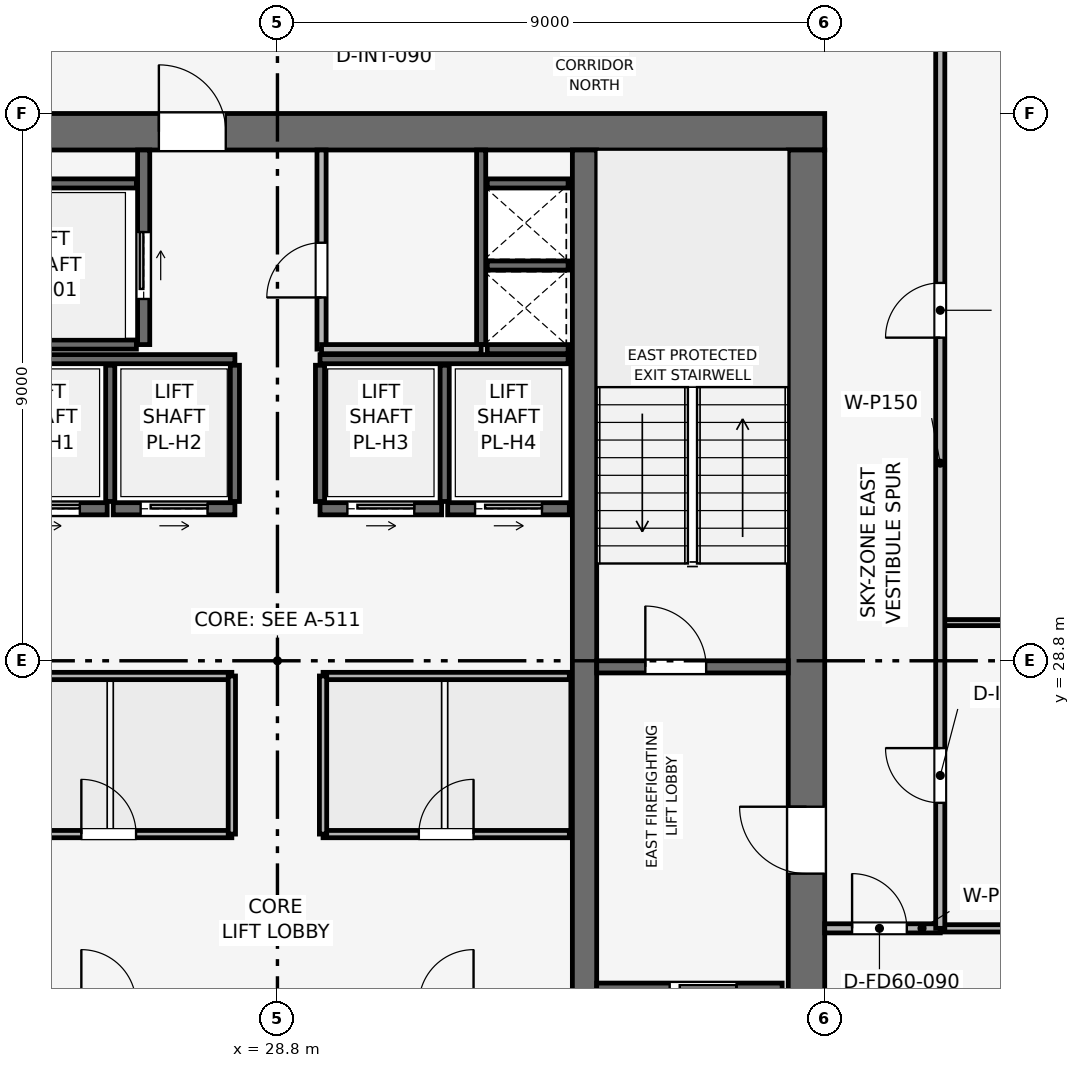
"""IFC4 building model, lengths in metres.
Left out: names, types, materials, properties, quantities, classifications, styles, units other than length and angle.
Written with IfcOpenShell. Run it as: python <this file> out.ifc"""

import sys

from ifc_helpers import new_model, si_unit, direction, frame, frame_2d, origin, place, context, subcontext, project, spatial, rectangle, extrude, element, fill, save


model = new_model("IFC4")
c1 = context("Model", 3, precision=1e-05, world=origin(), true_north=direction((0.0, 1.0)))
c2 = subcontext(c1, "Body", "Model", "MODEL_VIEW")
j1 = project(units=[si_unit("LENGTHUNIT", "METRE"), si_unit("PLANEANGLEUNIT", "RADIAN")], contexts=[c1])
p1 = place(None, origin())
s1 = spatial("IfcSite", under=j1, at=p1, CompositionType="ELEMENT")
p2 = place(p1, origin())
s2 = spatial("IfcBuilding", under=s1, at=p2, CompositionType="ELEMENT")
p3 = place(p2, frame((0.0, 0.0, 321.75)))
s3 = spatial("IfcBuildingStorey", under=s2, at=p3, CompositionType="ELEMENT", Elevation=321.75)
p4 = place(p3, frame((19.8, 37.5, 0.0), z_axis=(0.0, 0.0, 1.0), x_axis=(1.0, 0.0, 0.0)))
e1 = element("IfcWall", 1, at=p4, inside=s3, PredefinedType="SHEAR", context=c2, shape_type="SweptSolid", body=[
    extrude(rectangle(XDim=18.0, YDim=0.6, at=frame_2d((9.0, 0.0))), origin(), (0.0, 0.0, 1.0), 3.75),
])
p5 = place(p4, frame((7.05, 0.0, 0.0)))
e2 = element("IfcOpeningElement", 2, at=p5, cuts=e1, PredefinedType="OPENING", context=c2, shape_type="SweptSolid", body=[
    extrude(rectangle(XDim=1.1, YDim=2.15, at=frame_2d((0.55, 1.075))), frame((0.0, 0.31, 0.0), z_axis=(0.0, -1.0, 0.0), x_axis=(1.0, 0.0, 0.0)), (0.0, 0.0, 1.0), 0.62),
])
p6 = place(p3, frame((37.5, 20.4, 0.0), z_axis=(0.0, 0.0, 1.0), x_axis=(0.0, 1.0, 0.0)))
e3 = element("IfcWall", 3, at=p6, inside=s3, PredefinedType="SHEAR", context=c2, shape_type="SweptSolid", body=[
    extrude(rectangle(XDim=16.8, YDim=0.6, at=frame_2d((8.4, 0.0))), origin(), (0.0, 0.0, 1.0), 3.75),
])
p7 = place(p6, frame((4.9, 0.0, 0.0)))
e4 = element("IfcOpeningElement", 4, at=p7, cuts=e3, PredefinedType="OPENING", context=c2, shape_type="SweptSolid", body=[
    extrude(rectangle(XDim=1.1, YDim=2.15, at=frame_2d((0.55, 1.075))), frame((0.0, 0.31, 0.0), z_axis=(0.0, -1.0, 0.0), x_axis=(1.0, 0.0, 0.0)), (0.0, 0.0, 1.0), 0.62),
])
p8 = place(p3, frame((33.85, 20.4, 0.0), z_axis=(0.0, 0.0, 1.0), x_axis=(0.0, 1.0, 0.0)))
e5 = element("IfcWall", 5, at=p8, inside=s3, PredefinedType="SHEAR", context=c2, shape_type="SweptSolid", body=[
    extrude(rectangle(XDim=16.8, YDim=0.4, at=frame_2d((8.4, 0.0))), origin(), (0.0, 0.0, 1.0), 3.75),
])
p9 = place(p3, frame((34.05, 28.7, 0.0), z_axis=(0.0, 0.0, 1.0), x_axis=(1.0, 0.0, 0.0)))
e6 = element("IfcWall", 6, at=p9, inside=s3, PredefinedType="SHEAR", context=c2, shape_type="SweptSolid", body=[
    extrude(rectangle(XDim=3.15, YDim=0.2, at=frame_2d((1.575, 0.0))), origin(), (0.0, 0.0, 1.0), 3.51),
])
p10 = place(p9, frame((0.8, 0.0, 0.0)))
e7 = element("IfcOpeningElement", 7, at=p10, cuts=e6, PredefinedType="OPENING", context=c2, shape_type="SweptSolid", body=[
    extrude(rectangle(XDim=1.0, YDim=2.1, at=frame_2d((0.5, 1.05))), frame((0.0, 0.11, 0.0), z_axis=(0.0, -1.0, 0.0), x_axis=(1.0, 0.0, 0.0)), (0.0, 0.0, 1.0), 0.22),
])
p11 = place(p3, frame((32.15, 34.0, 0.0), z_axis=(0.0, 0.0, 1.0), x_axis=(0.0, 1.0, 0.0)))
e8 = element("IfcWall", 8, at=p11, inside=s3, PredefinedType="SHEAR", context=c2, shape_type="SweptSolid", body=[
    extrude(rectangle(XDim=3.2, YDim=0.15, at=frame_2d((1.6, 0.0))), origin(), (0.0, 0.0, 1.0), 3.51),
])
for number, where, z_axis, x_axis in (
    (9, (32.25, 33.925, 0.0), (0.0, 0.0, 1.0), (1.0, 0.0, 0.0)),
    (10, (32.25, 35.3, 0.0), (0.0, 0.0, 1.0), (1.0, 0.0, 0.0)),
):
    element("IfcWall", number, at=place(p3, frame(where, z_axis=z_axis, x_axis=x_axis)), inside=s3, PredefinedType="SHEAR", context=c2, shape_type="SweptSolid", body=[
        extrude(rectangle(XDim=1.33, YDim=0.15, at=frame_2d((0.665, 0.0))), origin(), (0.0, 0.0, 1.0), 3.51),
    ])
p12 = place(p3, frame((34.05, 23.4, 0.0), z_axis=(0.0, 0.0, 1.0), x_axis=(1.0, 0.0, 0.0)))
e11 = element("IfcWall", 11, at=p12, inside=s3, PredefinedType="SHEAR", context=c2, shape_type="SweptSolid", body=[
    extrude(rectangle(XDim=3.05, YDim=0.2, at=frame_2d((1.525, 0.0))), origin(), (0.0, 0.0, 1.0), 3.51),
])
p13 = place(p12, frame((1.2, 0.0, 0.0)))
e12 = element("IfcOpeningElement", 12, at=p13, cuts=e11, PredefinedType="OPENING", context=c2, shape_type="SweptSolid", body=[
    extrude(rectangle(XDim=1.1, YDim=2.15, at=frame_2d((0.55, 1.075))), frame((0.0, 0.11, 0.0), z_axis=(0.0, -1.0, 0.0), x_axis=(1.0, 0.0, 0.0)), (0.0, 0.0, 1.0), 0.22),
])
p14 = place(p3, frame((26.6, 34.0, 0.0), z_axis=(0.0, 0.0, 1.0), x_axis=(0.0, 1.0, 0.0)))
e13 = element("IfcWall", 13, at=p14, inside=s3, PredefinedType="SHEAR", context=c2, shape_type="SweptSolid", body=[
    extrude(rectangle(XDim=3.2, YDim=0.2, at=frame_2d((1.6, 0.0))), origin(), (0.0, 0.0, 1.0), 3.51),
])
p15 = place(p14, frame((0.75, 0.0, 0.0)))
e14 = element("IfcOpeningElement", 14, at=p15, cuts=e13, PredefinedType="OPENING", context=c2, shape_type="SweptSolid", body=[
    extrude(rectangle(XDim=1.1, YDim=2.15, at=frame_2d((0.55, 1.075))), frame((0.0, 0.11, 0.0), z_axis=(0.0, -1.0, 0.0), x_axis=(1.0, 0.0, 0.0)), (0.0, 0.0, 1.0), 0.22),
])
for number, where, z_axis, x_axis in (
    (15, (24.0, 34.0, 0.0), (0.0, 0.0, 1.0), (1.0, 0.0, 0.0)),
    (16, (24.0, 36.65, 0.0), (0.0, 0.0, 1.0), (1.0, 0.0, 0.0)),
):
    element("IfcWall", number, at=place(p3, frame(where, z_axis=z_axis, x_axis=x_axis)), inside=s3, PredefinedType="SHEAR", context=c2, shape_type="SweptSolid", body=[
        extrude(rectangle(XDim=2.48, YDim=0.15, at=frame_2d((1.24, 0.0))), origin(), (0.0, 0.0, 1.0), 3.51),
    ])
p16 = place(p3, frame((24.0, 31.3, 0.0), z_axis=(0.0, 0.0, 1.0), x_axis=(1.0, 0.0, 0.0)))
e17 = element("IfcWall", 17, at=p16, inside=s3, PredefinedType="SHEAR", context=c2, shape_type="SweptSolid", body=[
    extrude(rectangle(XDim=2.0, YDim=0.2, at=frame_2d((1.0, 0.0))), origin(), (0.0, 0.0, 1.0), 3.51),
])
p17 = place(p16, frame((0.45, 0.0, 0.0)))
e18 = element("IfcOpeningElement", 18, at=p17, cuts=e17, PredefinedType="OPENING", context=c2, shape_type="SweptSolid", body=[
    extrude(rectangle(XDim=1.1, YDim=2.15, at=frame_2d((0.55, 1.075))), frame((0.0, 0.11, 0.0), z_axis=(0.0, -1.0, 0.0), x_axis=(1.0, 0.0, 0.0)), (0.0, 0.0, 1.0), 0.22),
])
p18 = place(p3, frame((26.1, 31.3, 0.0), z_axis=(0.0, 0.0, 1.0), x_axis=(1.0, 0.0, 0.0)))
e19 = element("IfcWall", 19, at=p18, inside=s3, PredefinedType="SHEAR", context=c2, shape_type="SweptSolid", body=[
    extrude(rectangle(XDim=2.0, YDim=0.2, at=frame_2d((1.0, 0.0))), origin(), (0.0, 0.0, 1.0), 3.51),
])
p19 = place(p18, frame((0.45, 0.0, 0.0)))
e20 = element("IfcOpeningElement", 20, at=p19, cuts=e19, PredefinedType="OPENING", context=c2, shape_type="SweptSolid", body=[
    extrude(rectangle(XDim=1.1, YDim=2.15, at=frame_2d((0.55, 1.075))), frame((0.0, 0.11, 0.0), z_axis=(0.0, -1.0, 0.0), x_axis=(1.0, 0.0, 0.0)), (0.0, 0.0, 1.0), 0.22),
])
p20 = place(p3, frame((29.5, 31.3, 0.0), z_axis=(0.0, 0.0, 1.0), x_axis=(1.0, 0.0, 0.0)))
e21 = element("IfcWall", 21, at=p20, inside=s3, PredefinedType="SHEAR", context=c2, shape_type="SweptSolid", body=[
    extrude(rectangle(XDim=2.0, YDim=0.2, at=frame_2d((1.0, 0.0))), origin(), (0.0, 0.0, 1.0), 3.51),
])
p21 = place(p20, frame((0.45, 0.0, 0.0)))
e22 = element("IfcOpeningElement", 22, at=p21, cuts=e21, PredefinedType="OPENING", context=c2, shape_type="SweptSolid", body=[
    extrude(rectangle(XDim=1.1, YDim=2.15, at=frame_2d((0.55, 1.075))), frame((0.0, 0.11, 0.0), z_axis=(0.0, -1.0, 0.0), x_axis=(1.0, 0.0, 0.0)), (0.0, 0.0, 1.0), 0.22),
])
p22 = place(p3, frame((31.6, 31.3, 0.0), z_axis=(0.0, 0.0, 1.0), x_axis=(1.0, 0.0, 0.0)))
e23 = element("IfcWall", 23, at=p22, inside=s3, PredefinedType="SHEAR", context=c2, shape_type="SweptSolid", body=[
    extrude(rectangle(XDim=2.0, YDim=0.2, at=frame_2d((1.0, 0.0))), origin(), (0.0, 0.0, 1.0), 3.51),
])
p23 = place(p22, frame((0.45, 0.0, 0.0)))
e24 = element("IfcOpeningElement", 24, at=p23, cuts=e23, PredefinedType="OPENING", context=c2, shape_type="SweptSolid", body=[
    extrude(rectangle(XDim=1.1, YDim=2.15, at=frame_2d((0.55, 1.075))), frame((0.0, 0.11, 0.0), z_axis=(0.0, -1.0, 0.0), x_axis=(1.0, 0.0, 0.0)), (0.0, 0.0, 1.0), 0.22),
])
p24 = place(p3, frame((32.25, 36.65, 0.0), z_axis=(0.0, 0.0, 1.0), x_axis=(1.0, 0.0, 0.0)))
e25 = element("IfcWall", 25, at=p24, inside=s3, PredefinedType="SHEAR", context=c2, shape_type="SweptSolid", body=[
    extrude(rectangle(XDim=1.33, YDim=0.15, at=frame_2d((0.665, 0.0))), origin(), (0.0, 0.0, 1.0), 3.51),
])
for number, where, z_axis, x_axis in (
    (26, (24.02, 33.76, 0.0), (0.0, 0.0, 1.0), (1.0, 0.0, 0.0)),
    (27, (29.5, 33.76, 0.0), (0.0, 0.0, 1.0), (1.0, 0.0, 0.0)),
):
    element("IfcWall", number, at=place(p3, frame(where, z_axis=z_axis, x_axis=x_axis)), inside=s3, PredefinedType="SHEAR", context=c2, shape_type="SweptSolid", body=[
        extrude(rectangle(XDim=4.08, YDim=0.15, at=frame_2d((2.04, 0.0))), origin(), (0.0, 0.0, 1.0), 3.51),
    ])
for number, where, z_axis, x_axis in (
    (28, (26.05, 31.42, 0.0), (0.0, 0.0, 1.0), (0.0, 1.0, 0.0)),
    (29, (28.1, 31.42, 0.0), (0.0, 0.0, 1.0), (0.0, 1.0, 0.0)),
    (30, (29.5, 31.42, 0.0), (0.0, 0.0, 1.0), (0.0, 1.0, 0.0)),
    (31, (31.55, 31.42, 0.0), (0.0, 0.0, 1.0), (0.0, 1.0, 0.0)),
):
    element("IfcWall", number, at=place(p3, frame(where, z_axis=z_axis, x_axis=x_axis)), inside=s3, PredefinedType="SHEAR", context=c2, shape_type="SweptSolid", body=[
        extrude(rectangle(XDim=2.24, YDim=0.15, at=frame_2d((1.12, 0.0))), origin(), (0.0, 0.0, 1.0), 3.51),
    ])
p25 = place(p3, frame((29.525, 33.925, 0.0), z_axis=(0.0, 0.0, 1.0), x_axis=(0.0, 1.0, 0.0)))
e32 = element("IfcWall", 32, at=p25, inside=s3, PredefinedType="PARTITIONING", context=c2, shape_type="SweptSolid", body=[
    extrude(rectangle(XDim=3.275, YDim=0.15, at=frame_2d((1.637, 0.0))), origin(), (0.0, 0.0, 1.0), 3.51),
])
p26 = place(p25, frame((0.85, 0.0, 0.0)))
e33 = element("IfcOpeningElement", 33, at=p26, cuts=e32, PredefinedType="OPENING", context=c2, shape_type="SweptSolid", body=[
    extrude(rectangle(XDim=0.9, YDim=2.1, at=frame_2d((0.45, 1.05))), frame((0.0, 0.085, 0.0), z_axis=(0.0, -1.0, 0.0), x_axis=(1.0, 0.0, 0.0)), (0.0, 0.0, 1.0), 0.17),
])
p27 = place(p3, frame((29.525, 33.925, 0.0), z_axis=(0.0, 0.0, 1.0), x_axis=(1.0, 0.0, 0.0)))
e34 = element("IfcWall", 34, at=p27, inside=s3, PredefinedType="PARTITIONING", context=c2, shape_type="SweptSolid", body=[
    extrude(rectangle(XDim=2.625, YDim=0.15, at=frame_2d((1.312, 0.0))), origin(), (0.0, 0.0, 1.0), 3.51),
])
p28 = place(p3, frame((24.0, 25.95, 0.0), z_axis=(0.0, 0.0, 1.0), x_axis=(1.0, 0.0, 0.0)))
e35 = element("IfcWall", 35, at=p28, inside=s3, PredefinedType="PARTITIONING", context=c2, shape_type="SweptSolid", body=[
    extrude(rectangle(XDim=4.05, YDim=0.12, at=frame_2d((2.025, 0.0))), origin(), (0.0, 0.0, 1.0), 3.51),
])
p29 = place(p28, frame((1.575, 0.0, 0.0)))
e36 = element("IfcOpeningElement", 36, at=p29, cuts=e35, PredefinedType="OPENING", context=c2, shape_type="SweptSolid", body=[
    extrude(rectangle(XDim=0.9, YDim=2.1, at=frame_2d((0.45, 1.05))), frame((0.0, 0.07, 0.0), z_axis=(0.0, -1.0, 0.0), x_axis=(1.0, 0.0, 0.0)), (0.0, 0.0, 1.0), 0.14),
])
p30 = place(p3, frame((24.0, 28.55, 0.0), z_axis=(0.0, 0.0, 1.0), x_axis=(1.0, 0.0, 0.0)))
e37 = element("IfcWall", 37, at=p30, inside=s3, PredefinedType="PARTITIONING", context=c2, shape_type="SweptSolid", body=[
    extrude(rectangle(XDim=4.05, YDim=0.12, at=frame_2d((2.025, 0.0))), origin(), (0.0, 0.0, 1.0), 3.51),
])
p31 = place(p3, frame((28.05, 25.95, 0.0), z_axis=(0.0, 0.0, 1.0), x_axis=(0.0, 1.0, 0.0)))
e38 = element("IfcWall", 38, at=p31, inside=s3, PredefinedType="PARTITIONING", context=c2, shape_type="SweptSolid", body=[
    extrude(rectangle(XDim=2.6, YDim=0.12, at=frame_2d((1.3, 0.0))), origin(), (0.0, 0.0, 1.0), 3.51),
])
p32 = place(p3, frame((29.55, 25.95, 0.0), z_axis=(0.0, 0.0, 1.0), x_axis=(1.0, 0.0, 0.0)))
e39 = element("IfcWall", 39, at=p32, inside=s3, PredefinedType="PARTITIONING", context=c2, shape_type="SweptSolid", body=[
    extrude(rectangle(XDim=4.05, YDim=0.12, at=frame_2d((2.025, 0.0))), origin(), (0.0, 0.0, 1.0), 3.51),
])
p33 = place(p32, frame((1.575, 0.0, 0.0)))
e40 = element("IfcOpeningElement", 40, at=p33, cuts=e39, PredefinedType="OPENING", context=c2, shape_type="SweptSolid", body=[
    extrude(rectangle(XDim=0.9, YDim=2.1, at=frame_2d((0.45, 1.05))), frame((0.0, 0.07, 0.0), z_axis=(0.0, -1.0, 0.0), x_axis=(1.0, 0.0, 0.0)), (0.0, 0.0, 1.0), 0.14),
])
p34 = place(p3, frame((29.55, 28.55, 0.0), z_axis=(0.0, 0.0, 1.0), x_axis=(1.0, 0.0, 0.0)))
e41 = element("IfcWall", 41, at=p34, inside=s3, PredefinedType="PARTITIONING", context=c2, shape_type="SweptSolid", body=[
    extrude(rectangle(XDim=4.05, YDim=0.12, at=frame_2d((2.025, 0.0))), origin(), (0.0, 0.0, 1.0), 3.51),
])
p35 = place(p3, frame((29.55, 25.95, 0.0), z_axis=(0.0, 0.0, 1.0), x_axis=(0.0, 1.0, 0.0)))
e42 = element("IfcWall", 42, at=p35, inside=s3, PredefinedType="PARTITIONING", context=c2, shape_type="SweptSolid", body=[
    extrude(rectangle(XDim=2.6, YDim=0.12, at=frame_2d((1.3, 0.0))), origin(), (0.0, 0.0, 1.0), 3.51),
])
p36 = place(p3, frame((37.8, 24.4, 0.0), z_axis=(0.0, 0.0, 1.0), x_axis=(1.0, 0.0, 0.0)))
e43 = element("IfcWall", 43, at=p36, inside=s3, PredefinedType="PARTITIONING", context=c2, shape_type="SweptSolid", body=[
    extrude(rectangle(XDim=1.9, YDim=0.15, at=frame_2d((0.95, 0.0))), origin(), (0.0, 0.0, 1.0), 3.51),
])
p37 = place(p36, frame((0.45, 0.0, 0.0)))
e44 = element("IfcOpeningElement", 44, at=p37, cuts=e43, PredefinedType="OPENING", context=c2, shape_type="SweptSolid", body=[
    extrude(rectangle(XDim=0.9, YDim=2.1, at=frame_2d((0.45, 1.05))), frame((0.0, 0.085, 0.0), z_axis=(0.0, -1.0, 0.0), x_axis=(1.0, 0.0, 0.0)), (0.0, 0.0, 1.0), 0.17),
])
p38 = place(p3, frame((39.7, 24.4, 0.0), z_axis=(0.0, 0.0, 1.0), x_axis=(1.0, 0.0, 0.0)))
e45 = element("IfcWall", 45, at=p38, inside=s3, PredefinedType="PARTITIONING", context=c2, shape_type="SweptSolid", body=[
    extrude(rectangle(XDim=11.77, YDim=0.12, at=frame_2d((5.885, 0.0))), origin(), (0.0, 0.0, 1.0), 3.135),
])
p39 = place(p3, frame((39.7, 29.428, 0.0), z_axis=(0.0, 0.0, 1.0), x_axis=(1.0, 0.0, 0.0)))
e46 = element("IfcWall", 46, at=p39, inside=s3, PredefinedType="MOVABLE", context=c2, shape_type="SweptSolid", body=[
    extrude(rectangle(XDim=11.77, YDim=0.1, at=frame_2d((5.885, 0.0))), origin(), (0.0, 0.0, 1.0), 3.135),
])
p40 = place(p3, frame((39.7, 24.4, 0.0), z_axis=(0.0, 0.0, 1.0), x_axis=(0.0, 1.0, 0.0)))
e47 = element("IfcWall", 47, at=p40, inside=s3, PredefinedType="PARTITIONING", context=c2, shape_type="SweptSolid", body=[
    extrude(rectangle(XDim=15.3, YDim=0.15, at=frame_2d((7.65, 0.0))), origin(), (0.0, 0.0, 1.0), 3.095),
])
p41 = place(p40, frame((2.064, 0.0, 0.0)))
e48 = element("IfcOpeningElement", 48, at=p41, cuts=e47, PredefinedType="OPENING", context=c2, shape_type="SweptSolid", body=[
    extrude(rectangle(XDim=0.9, YDim=2.1, at=frame_2d((0.45, 1.05))), frame((0.0, 0.085, 0.0), z_axis=(0.0, -1.0, 0.0), x_axis=(1.0, 0.0, 0.0)), (0.0, 0.0, 1.0), 0.17),
])
p42 = place(p40, frame((9.714, 0.0, 0.0)))
e49 = element("IfcOpeningElement", 49, at=p42, cuts=e47, PredefinedType="OPENING", context=c2, shape_type="SweptSolid", body=[
    extrude(rectangle(XDim=0.9, YDim=2.1, at=frame_2d((0.45, 1.05))), frame((0.0, 0.085, 0.0), z_axis=(0.0, -1.0, 0.0), x_axis=(1.0, 0.0, 0.0)), (0.0, 0.0, 1.0), 0.17),
])
p43 = place(p10, origin())
e50 = element("IfcDoor", 50, at=p43, inside=s3, OperationType="SINGLE_SWING_LEFT", PredefinedType="DOOR", context=c2, shape_type="SweptSolid", body=[
    extrude(rectangle(XDim=1.0, YDim=2.1, at=frame_2d((0.5, 1.05))), frame((0.0, 0.025, 0.0), z_axis=(0.0, -1.0, 0.0), x_axis=(1.0, 0.0, 0.0)), (0.0, 0.0, 1.0), 0.05),
])
fill(e7, e50)
p44 = place(p13, origin())
e51 = element("IfcDoor", 51, at=p44, inside=s3, OperationType="SLIDING_TO_RIGHT", PredefinedType="DOOR", context=c2, shape_type="SweptSolid", body=[
    extrude(rectangle(XDim=1.1, YDim=2.15, at=frame_2d((0.55, 1.075))), frame((0.0, 0.025, 0.0), z_axis=(0.0, -1.0, 0.0), x_axis=(1.0, 0.0, 0.0)), (0.0, 0.0, 1.0), 0.05),
])
fill(e12, e51)
p45 = place(p15, origin())
e52 = element("IfcDoor", 52, at=p45, inside=s3, OperationType="SLIDING_TO_RIGHT", PredefinedType="DOOR", context=c2, shape_type="SweptSolid", body=[
    extrude(rectangle(XDim=1.1, YDim=2.15, at=frame_2d((0.55, 1.075))), frame((0.0, 0.025, 0.0), z_axis=(0.0, -1.0, 0.0), x_axis=(1.0, 0.0, 0.0)), (0.0, 0.0, 1.0), 0.05),
])
fill(e14, e52)
p46 = place(p17, origin())
e53 = element("IfcDoor", 53, at=p46, inside=s3, OperationType="SLIDING_TO_RIGHT", PredefinedType="DOOR", context=c2, shape_type="SweptSolid", body=[
    extrude(rectangle(XDim=1.1, YDim=2.15, at=frame_2d((0.55, 1.075))), frame((0.0, 0.025, 0.0), z_axis=(0.0, -1.0, 0.0), x_axis=(1.0, 0.0, 0.0)), (0.0, 0.0, 1.0), 0.05),
])
fill(e18, e53)
p47 = place(p19, origin())
e54 = element("IfcDoor", 54, at=p47, inside=s3, OperationType="SLIDING_TO_RIGHT", PredefinedType="DOOR", context=c2, shape_type="SweptSolid", body=[
    extrude(rectangle(XDim=1.1, YDim=2.15, at=frame_2d((0.55, 1.075))), frame((0.0, 0.025, 0.0), z_axis=(0.0, -1.0, 0.0), x_axis=(1.0, 0.0, 0.0)), (0.0, 0.0, 1.0), 0.05),
])
fill(e20, e54)
p48 = place(p21, origin())
e55 = element("IfcDoor", 55, at=p48, inside=s3, OperationType="SLIDING_TO_RIGHT", PredefinedType="DOOR", context=c2, shape_type="SweptSolid", body=[
    extrude(rectangle(XDim=1.1, YDim=2.15, at=frame_2d((0.55, 1.075))), frame((0.0, 0.025, 0.0), z_axis=(0.0, -1.0, 0.0), x_axis=(1.0, 0.0, 0.0)), (0.0, 0.0, 1.0), 0.05),
])
fill(e22, e55)
p49 = place(p23, origin())
e56 = element("IfcDoor", 56, at=p49, inside=s3, OperationType="SLIDING_TO_RIGHT", PredefinedType="DOOR", context=c2, shape_type="SweptSolid", body=[
    extrude(rectangle(XDim=1.1, YDim=2.15, at=frame_2d((0.55, 1.075))), frame((0.0, 0.025, 0.0), z_axis=(0.0, -1.0, 0.0), x_axis=(1.0, 0.0, 0.0)), (0.0, 0.0, 1.0), 0.05),
])
fill(e24, e56)
p50 = place(p26, origin())
e57 = element("IfcDoor", 57, at=p50, inside=s3, OperationType="SINGLE_SWING_LEFT", PredefinedType="DOOR", context=c2, shape_type="SweptSolid", body=[
    extrude(rectangle(XDim=0.9, YDim=2.1, at=frame_2d((0.45, 1.05))), frame((0.0, 0.025, 0.0), z_axis=(0.0, -1.0, 0.0), x_axis=(1.0, 0.0, 0.0)), (0.0, 0.0, 1.0), 0.05),
])
fill(e33, e57)
p51 = place(p29, origin())
e58 = element("IfcDoor", 58, at=p51, inside=s3, OperationType="SINGLE_SWING_LEFT", PredefinedType="DOOR", context=c2, shape_type="SweptSolid", body=[
    extrude(rectangle(XDim=0.9, YDim=2.1, at=frame_2d((0.45, 1.05))), frame((0.0, 0.025, 0.0), z_axis=(0.0, -1.0, 0.0), x_axis=(1.0, 0.0, 0.0)), (0.0, 0.0, 1.0), 0.05),
])
fill(e36, e58)
p52 = place(p33, origin())
e59 = element("IfcDoor", 59, at=p52, inside=s3, OperationType="SINGLE_SWING_RIGHT", PredefinedType="DOOR", context=c2, shape_type="SweptSolid", body=[
    extrude(rectangle(XDim=0.9, YDim=2.1, at=frame_2d((0.45, 1.05))), frame((0.0, 0.025, 0.0), z_axis=(0.0, -1.0, 0.0), x_axis=(1.0, 0.0, 0.0)), (0.0, 0.0, 1.0), 0.05),
])
fill(e40, e59)
p53 = place(p37, origin())
e60 = element("IfcDoor", 60, at=p53, inside=s3, OperationType="SINGLE_SWING_LEFT", PredefinedType="DOOR", context=c2, shape_type="SweptSolid", body=[
    extrude(rectangle(XDim=0.9, YDim=2.1, at=frame_2d((0.45, 1.05))), frame((0.0, 0.025, 0.0), z_axis=(0.0, -1.0, 0.0), x_axis=(1.0, 0.0, 0.0)), (0.0, 0.0, 1.0), 0.05),
])
fill(e44, e60)
p54 = place(p41, origin())
e61 = element("IfcDoor", 61, at=p54, inside=s3, OperationType="SINGLE_SWING_RIGHT", PredefinedType="DOOR", context=c2, shape_type="SweptSolid", body=[
    extrude(rectangle(XDim=0.9, YDim=2.1, at=frame_2d((0.45, 1.05))), frame((0.0, 0.025, 0.0), z_axis=(0.0, -1.0, 0.0), x_axis=(1.0, 0.0, 0.0)), (0.0, 0.0, 1.0), 0.05),
])
fill(e48, e61)
p55 = place(p42, origin())
e62 = element("IfcDoor", 62, at=p55, inside=s3, OperationType="SINGLE_SWING_LEFT", PredefinedType="DOOR", context=c2, shape_type="SweptSolid", body=[
    extrude(rectangle(XDim=0.9, YDim=2.1, at=frame_2d((0.45, 1.05))), frame((0.0, 0.025, 0.0), z_axis=(0.0, -1.0, 0.0), x_axis=(1.0, 0.0, 0.0)), (0.0, 0.0, 1.0), 0.05),
])
fill(e49, e62)
p56 = place(p7, origin())
e63 = element("IfcDoor", 63, at=p56, inside=s3, OperationType="SINGLE_SWING_RIGHT", PredefinedType="DOOR", context=c2, shape_type="SweptSolid", body=[
    extrude(rectangle(XDim=1.1, YDim=2.15, at=frame_2d((0.55, 1.075))), frame((0.0, 0.025, 0.0), z_axis=(0.0, -1.0, 0.0), x_axis=(1.0, 0.0, 0.0)), (0.0, 0.0, 1.0), 0.05),
])
fill(e4, e63)
p57 = place(p5, origin())
e64 = element("IfcDoor", 64, at=p57, inside=s3, OperationType="SINGLE_SWING_LEFT", PredefinedType="DOOR", context=c2, shape_type="SweptSolid", body=[
    extrude(rectangle(XDim=1.1, YDim=2.15, at=frame_2d((0.55, 1.075))), frame((0.0, 0.025, 0.0), z_axis=(0.0, -1.0, 0.0), x_axis=(1.0, 0.0, 0.0)), (0.0, 0.0, 1.0), 0.05),
])
fill(e2, e64)
save(model, sys.argv[1])
